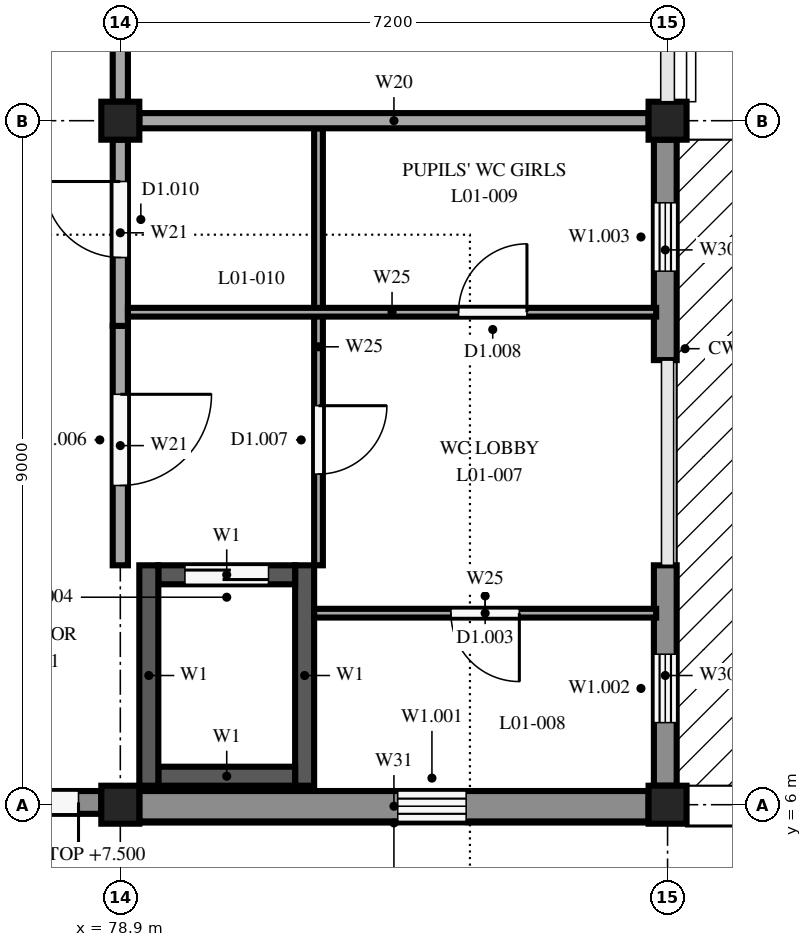
"""IFC4 building model, lengths in metres.
Left out: names, types, materials, properties, quantities, classifications, styles, units other than length and angle.
Written with IfcOpenShell. Run it as: python <this file> out.ifc"""

import sys

from ifc_helpers import new_model, si_unit, direction, frame, frame_2d, origin, origin_2d, place, context, subcontext, project, spatial, rectangle, extrude, element, fill, save


model = new_model("IFC4")
c1 = context("Model", 3, precision=1e-05, world=origin(), true_north=direction((0.0, 1.0)))
c2 = subcontext(c1, "Body", "Model", "MODEL_VIEW")
j1 = project(units=[si_unit("LENGTHUNIT", "METRE"), si_unit("PLANEANGLEUNIT", "RADIAN")], contexts=[c1])
p1 = place(None, origin())
s1 = spatial("IfcSite", under=j1, at=p1, CompositionType="ELEMENT")
p2 = place(p1, origin())
s2 = spatial("IfcBuilding", under=s1, at=p2, CompositionType="ELEMENT")
p3 = place(p2, frame((0.0, 0.0, 4.5)))
s3 = spatial("IfcBuildingStorey", under=s2, at=p3, CompositionType="ELEMENT", Elevation=4.5)
for number, where, z_axis, x_axis in (
    (1, (78.9, 6.0, 0.0), (0.0, 0.0, 1.0), (1.0, 0.0, 0.0)),
    (2, (78.9, 15.0, 0.0), (0.0, 0.0, 1.0), (1.0, 0.0, 0.0)),
    (3, (86.1, 6.0, 0.0), (0.0, 0.0, 1.0), (1.0, 0.0, 0.0)),
    (4, (86.1, 15.0, 0.0), (0.0, 0.0, 1.0), (1.0, 0.0, 0.0)),
):
    element("IfcColumn", number, at=place(p3, frame(where, z_axis=z_axis, x_axis=x_axis)), inside=s3, PredefinedType="COLUMN", context=c2, shape_type="SweptSolid", body=[
        extrude(rectangle(XDim=0.5, YDim=0.5, at=origin_2d()), origin(), (0.0, 0.0, 1.0), 3.35),
    ])
for number, where, z_axis, x_axis in (
    (5, (79.275, 6.25, 0.0), (0.0, 0.0, 1.0), (0.0, 1.0, 0.0)),
    (6, (81.325, 6.25, 0.0), (0.0, 0.0, 1.0), (0.0, 1.0, 0.0)),
):
    element("IfcWall", number, at=place(p3, frame(where, z_axis=z_axis, x_axis=x_axis)), inside=s3, PredefinedType="SHEAR", context=c2, shape_type="SweptSolid", body=[
        extrude(rectangle(XDim=2.9, YDim=0.25, at=frame_2d((1.45, 0.0))), origin(), (0.0, 0.0, 1.0), 3.35),
    ])
p4 = place(p3, frame((79.4, 6.375, 0.0), z_axis=(0.0, 0.0, 1.0), x_axis=(1.0, 0.0, 0.0)))
e7 = element("IfcWall", 7, at=p4, inside=s3, PredefinedType="SHEAR", context=c2, shape_type="SweptSolid", body=[
    extrude(rectangle(XDim=1.8, YDim=0.25, at=frame_2d((0.9, 0.0))), origin(), (0.0, 0.0, 1.0), 3.35),
])
p5 = place(p3, frame((79.4, 9.025, 0.0), z_axis=(0.0, 0.0, 1.0), x_axis=(1.0, 0.0, 0.0)))
e8 = element("IfcWall", 8, at=p5, inside=s3, PredefinedType="SHEAR", context=c2, shape_type="SweptSolid", body=[
    extrude(rectangle(XDim=1.8, YDim=0.25, at=frame_2d((0.9, 0.0))), origin(), (0.0, 0.0, 1.0), 3.35),
])
p6 = place(p5, frame((0.35, 0.0, 0.0)))
e9 = element("IfcOpeningElement", 9, at=p6, cuts=e8, PredefinedType="OPENING", context=c2, shape_type="SweptSolid", body=[
    extrude(rectangle(XDim=1.1, YDim=2.1, at=frame_2d((0.55, 1.05))), frame((0.0, 0.135, 0.0), z_axis=(0.0, -1.0, 0.0), x_axis=(1.0, 0.0, 0.0)), (0.0, 0.0, 1.0), 0.27),
])
p7 = place(p3, frame((86.07, 9.15, 0.0), z_axis=(0.0, 0.0, 1.0), x_axis=(0.0, -1.0, 0.0)))
e10 = element("IfcWall", 10, at=p7, inside=s3, PredefinedType="STANDARD", context=c2, shape_type="SweptSolid", body=[
    extrude(rectangle(XDim=2.9, YDim=0.3, at=frame_2d((1.45, 0.0))), origin(), (0.0, 0.0, 1.0), 2.85),
])
p8 = place(p7, frame((1.17, 0.0, 1.6)))
e11 = element("IfcOpeningElement", 11, at=p8, cuts=e10, PredefinedType="OPENING", context=c2, shape_type="SweptSolid", body=[
    extrude(rectangle(XDim=0.9, YDim=1.0, at=frame_2d((0.45, 0.5))), frame((0.0, 0.16, 0.0), z_axis=(0.0, -1.0, 0.0), x_axis=(1.0, 0.0, 0.0)), (0.0, 0.0, 1.0), 0.32),
])
p9 = place(p3, frame((86.07, 14.75, 0.0), z_axis=(0.0, 0.0, 1.0), x_axis=(0.0, -1.0, 0.0)))
e12 = element("IfcWall", 12, at=p9, inside=s3, PredefinedType="STANDARD", context=c2, shape_type="SweptSolid", body=[
    extrude(rectangle(XDim=2.9, YDim=0.3, at=frame_2d((1.45, 0.0))), origin(), (0.0, 0.0, 1.0), 2.85),
])
p10 = place(p9, frame((0.83, 0.0, 1.6)))
e13 = element("IfcOpeningElement", 13, at=p10, cuts=e12, PredefinedType="OPENING", context=c2, shape_type="SweptSolid", body=[
    extrude(rectangle(XDim=0.9, YDim=1.0, at=frame_2d((0.45, 0.5))), frame((0.0, 0.16, 0.0), z_axis=(0.0, -1.0, 0.0), x_axis=(1.0, 0.0, 0.0)), (0.0, 0.0, 1.0), 0.32),
])
p11 = place(p3, frame((78.65, 6.03, 0.0), z_axis=(0.0, 0.0, 1.0), x_axis=(-1.0, 0.0, 0.0)))
e14 = element("IfcWall", 14, at=p11, inside=s3, PredefinedType="STANDARD", context=c2, shape_type="SweptSolid", body=[
    extrude(rectangle(XDim=2.2, YDim=0.3, at=frame_2d((1.1, 0.0))), origin(), (0.0, 0.0, 1.0), 3.0),
])
p12 = place(p11, frame((0.3, 0.0, 0.0)))
e15 = element("IfcOpeningElement", 15, at=p12, cuts=e14, PredefinedType="OPENING", context=c2, shape_type="SweptSolid", body=[
    extrude(rectangle(XDim=1.6, YDim=2.4, at=frame_2d((0.8, 1.2))), frame((0.0, 0.16, 0.0), z_axis=(0.0, -1.0, 0.0), x_axis=(1.0, 0.0, 0.0)), (0.0, 0.0, 1.0), 0.32),
])
p13 = place(p3, frame((85.85, 5.98, 0.0), z_axis=(0.0, 0.0, 1.0), x_axis=(-1.0, 0.0, 0.0)))
e16 = element("IfcWall", 16, at=p13, inside=s3, PredefinedType="STANDARD", context=c2, shape_type="SweptSolid", body=[
    extrude(rectangle(XDim=6.7, YDim=0.4, at=frame_2d((3.35, 0.0))), origin(), (0.0, 0.0, 1.0), 2.9),
])
p14 = place(p13, frame((2.4, 0.0, 1.6)))
e17 = element("IfcOpeningElement", 17, at=p14, cuts=e16, PredefinedType="OPENING", context=c2, shape_type="SweptSolid", body=[
    extrude(rectangle(XDim=0.9, YDim=1.0, at=frame_2d((0.45, 0.5))), frame((0.0, 0.21, 0.0), z_axis=(0.0, -1.0, 0.0), x_axis=(1.0, 0.0, 0.0)), (0.0, 0.0, 1.0), 0.42),
])
p15 = place(p3, frame((78.9, 12.3, 0.0), z_axis=(0.0, 0.0, 1.0), x_axis=(0.0, -1.0, 0.0)))
e18 = element("IfcWall", 18, at=p15, inside=s3, PredefinedType="PARTITIONING", context=c2, shape_type="SweptSolid", body=[
    extrude(rectangle(XDim=3.15, YDim=0.2, at=frame_2d((1.575, 0.0))), origin(), (0.0, 0.0, 1.0), 2.9),
])
p16 = place(p15, frame((0.9, 0.0, 0.0)))
e19 = element("IfcOpeningElement", 19, at=p16, cuts=e18, PredefinedType="OPENING", context=c2, shape_type="SweptSolid", body=[
    extrude(rectangle(XDim=1.2, YDim=2.1, at=frame_2d((0.6, 1.05))), frame((0.0, 0.11, 0.0), z_axis=(0.0, -1.0, 0.0), x_axis=(1.0, 0.0, 0.0)), (0.0, 0.0, 1.0), 0.22),
])
p17 = place(p3, frame((78.9, 12.3, 0.0), z_axis=(0.0, 0.0, 1.0), x_axis=(0.0, 1.0, 0.0)))
e20 = element("IfcWall", 20, at=p17, inside=s3, PredefinedType="PARTITIONING", context=c2, shape_type="SweptSolid", body=[
    extrude(rectangle(XDim=2.45, YDim=0.2, at=frame_2d((1.225, 0.0))), origin(), (0.0, 0.0, 1.0), 2.9),
])
p18 = place(p17, frame((0.9, 0.0, 0.0)))
e21 = element("IfcOpeningElement", 21, at=p18, cuts=e20, PredefinedType="OPENING", context=c2, shape_type="SweptSolid", body=[
    extrude(rectangle(XDim=1.0, YDim=2.1, at=frame_2d((0.5, 1.05))), frame((0.0, 0.11, 0.0), z_axis=(0.0, -1.0, 0.0), x_axis=(1.0, 0.0, 0.0)), (0.0, 0.0, 1.0), 0.22),
])
p19 = place(p3, frame((79.15, 15.0, 0.0), z_axis=(0.0, 0.0, 1.0), x_axis=(1.0, 0.0, 0.0)))
e22 = element("IfcWall", 22, at=p19, inside=s3, PredefinedType="PARTITIONING", context=c2, shape_type="SweptSolid", body=[
    extrude(rectangle(XDim=6.7, YDim=0.2, at=frame_2d((3.35, 0.0))), origin(), (0.0, 0.0, 1.0), 2.9),
])
p20 = place(p3, frame((81.508, 14.9, 0.0), z_axis=(0.0, 0.0, 1.0), x_axis=(0.0, -1.0, 0.0)))
e23 = element("IfcWall", 23, at=p20, inside=s3, PredefinedType="PARTITIONING", context=c2, shape_type="SweptSolid", body=[
    extrude(rectangle(XDim=5.75, YDim=0.115, at=frame_2d((2.875, 0.0))), origin(), (0.0, 0.0, 1.0), 3.35),
])
p21 = place(p20, frame((3.65, 0.0, 0.0)))
e24 = element("IfcOpeningElement", 24, at=p21, cuts=e23, PredefinedType="OPENING", context=c2, shape_type="SweptSolid", body=[
    extrude(rectangle(XDim=0.9, YDim=2.1, at=frame_2d((0.45, 1.05))), frame((0.0, 0.067, 0.0), z_axis=(0.0, -1.0, 0.0), x_axis=(1.0, 0.0, 0.0)), (0.0, 0.0, 1.0), 0.135),
])
p22 = place(p3, frame((85.95, 8.52, 0.0), z_axis=(0.0, 0.0, 1.0), x_axis=(-1.0, 0.0, 0.0)))
e25 = element("IfcWall", 25, at=p22, inside=s3, PredefinedType="PARTITIONING", context=c2, shape_type="SweptSolid", body=[
    extrude(rectangle(XDim=4.5, YDim=0.115, at=frame_2d((2.25, 0.0))), origin(), (0.0, 0.0, 1.0), 3.35),
])
p23 = place(p22, frame((1.8, 0.0, 0.0)))
e26 = element("IfcOpeningElement", 26, at=p23, cuts=e25, PredefinedType="OPENING", context=c2, shape_type="SweptSolid", body=[
    extrude(rectangle(XDim=0.9, YDim=2.1, at=frame_2d((0.45, 1.05))), frame((0.0, 0.067, 0.0), z_axis=(0.0, -1.0, 0.0), x_axis=(1.0, 0.0, 0.0)), (0.0, 0.0, 1.0), 0.135),
])
p24 = place(p3, frame((79.0, 12.48, 0.0), z_axis=(0.0, 0.0, 1.0), x_axis=(1.0, 0.0, 0.0)))
e27 = element("IfcWall", 27, at=p24, inside=s3, PredefinedType="PARTITIONING", context=c2, shape_type="SweptSolid", body=[
    extrude(rectangle(XDim=6.95, YDim=0.115, at=frame_2d((3.475, 0.0))), origin(), (0.0, 0.0, 1.0), 3.35),
])
p25 = place(p24, frame((4.35, 0.0, 0.0)))
e28 = element("IfcOpeningElement", 28, at=p25, cuts=e27, PredefinedType="OPENING", context=c2, shape_type="SweptSolid", body=[
    extrude(rectangle(XDim=0.9, YDim=2.1, at=frame_2d((0.45, 1.05))), frame((0.0, 0.067, 0.0), z_axis=(0.0, -1.0, 0.0), x_axis=(1.0, 0.0, 0.0)), (0.0, 0.0, 1.0), 0.135),
])
p26 = place(p3, frame((78.9, 23.75, 0.0), z_axis=(0.0, 0.0, 1.0), x_axis=(0.0, -1.0, 0.0)))
e29 = element("IfcWall", 29, at=p26, inside=s3, PredefinedType="PARTITIONING", context=c2, shape_type="SweptSolid", body=[
    extrude(rectangle(XDim=8.5, YDim=0.2, at=frame_2d((4.25, 0.0))), origin(), (0.0, 0.0, 1.0), 2.9),
])
p27 = place(p26, frame((3.5, 0.0, 0.0)))
e30 = element("IfcOpeningElement", 30, at=p27, cuts=e29, PredefinedType="OPENING", context=c2, shape_type="SweptSolid", body=[
    extrude(rectangle(XDim=1.5, YDim=2.1, at=frame_2d((0.75, 1.05))), frame((0.0, 0.11, 0.0), z_axis=(0.0, -1.0, 0.0), x_axis=(1.0, 0.0, 0.0)), (0.0, 0.0, 1.0), 0.22),
])
p28 = place(p8, origin())
e31 = element("IfcWindow", 31, at=p28, inside=s3, PartitioningType="SINGLE_PANEL", PredefinedType="WINDOW", context=c2, shape_type="SweptSolid", body=[
    extrude(rectangle(XDim=0.9, YDim=1.0, at=frame_2d((0.45, 0.5))), frame((0.0, 0.03, 0.0), z_axis=(0.0, -1.0, 0.0), x_axis=(1.0, 0.0, 0.0)), (0.0, 0.0, 1.0), 0.06),
])
fill(e11, e31)
p29 = place(p10, origin())
e32 = element("IfcWindow", 32, at=p29, inside=s3, PartitioningType="SINGLE_PANEL", PredefinedType="WINDOW", context=c2, shape_type="SweptSolid", body=[
    extrude(rectangle(XDim=0.9, YDim=1.0, at=frame_2d((0.45, 0.5))), frame((0.0, 0.03, 0.0), z_axis=(0.0, -1.0, 0.0), x_axis=(1.0, 0.0, 0.0)), (0.0, 0.0, 1.0), 0.06),
])
fill(e13, e32)
p30 = place(p12, origin())
e33 = element("IfcDoor", 33, at=p30, inside=s3, OperationType="DOUBLE_DOOR_SINGLE_SWING", PredefinedType="DOOR", context=c2, shape_type="SweptSolid", body=[
    extrude(rectangle(XDim=1.6, YDim=2.4, at=frame_2d((0.8, 1.2))), frame((0.0, 0.025, 0.0), z_axis=(0.0, -1.0, 0.0), x_axis=(1.0, 0.0, 0.0)), (0.0, 0.0, 1.0), 0.05),
])
fill(e15, e33)
p31 = place(p14, origin())
e34 = element("IfcWindow", 34, at=p31, inside=s3, PartitioningType="SINGLE_PANEL", PredefinedType="WINDOW", context=c2, shape_type="SweptSolid", body=[
    extrude(rectangle(XDim=0.9, YDim=1.0, at=frame_2d((0.45, 0.5))), frame((0.0, 0.03, 0.0), z_axis=(0.0, -1.0, 0.0), x_axis=(1.0, 0.0, 0.0)), (0.0, 0.0, 1.0), 0.06),
])
fill(e17, e34)
p32 = place(p16, origin())
e35 = element("IfcDoor", 35, at=p32, inside=s3, OperationType="SINGLE_SWING_LEFT", PredefinedType="DOOR", context=c2, shape_type="SweptSolid", body=[
    extrude(rectangle(XDim=1.2, YDim=2.1, at=frame_2d((0.6, 1.05))), frame((0.0, 0.025, 0.0), z_axis=(0.0, -1.0, 0.0), x_axis=(1.0, 0.0, 0.0)), (0.0, 0.0, 1.0), 0.05),
])
fill(e19, e35)
p33 = place(p18, origin())
e36 = element("IfcDoor", 36, at=p33, inside=s3, OperationType="SINGLE_SWING_RIGHT", PredefinedType="DOOR", context=c2, shape_type="SweptSolid", body=[
    extrude(rectangle(XDim=1.0, YDim=2.1, at=frame_2d((0.5, 1.05))), frame((0.0, 0.025, 0.0), z_axis=(0.0, -1.0, 0.0), x_axis=(1.0, 0.0, 0.0)), (0.0, 0.0, 1.0), 0.05),
])
fill(e21, e36)
p34 = place(p21, origin())
e37 = element("IfcDoor", 37, at=p34, inside=s3, OperationType="SINGLE_SWING_LEFT", PredefinedType="DOOR", context=c2, shape_type="SweptSolid", body=[
    extrude(rectangle(XDim=0.9, YDim=2.1, at=frame_2d((0.45, 1.05))), frame((0.0, 0.025, 0.0), z_axis=(0.0, -1.0, 0.0), x_axis=(1.0, 0.0, 0.0)), (0.0, 0.0, 1.0), 0.05),
])
fill(e24, e37)
p35 = place(p23, origin())
e38 = element("IfcDoor", 38, at=p35, inside=s3, OperationType="SINGLE_SWING_LEFT", PredefinedType="DOOR", context=c2, shape_type="SweptSolid", body=[
    extrude(rectangle(XDim=0.9, YDim=2.1, at=frame_2d((0.45, 1.05))), frame((0.0, 0.025, 0.0), z_axis=(0.0, -1.0, 0.0), x_axis=(1.0, 0.0, 0.0)), (0.0, 0.0, 1.0), 0.05),
])
fill(e26, e38)
p36 = place(p25, origin())
e39 = element("IfcDoor", 39, at=p36, inside=s3, OperationType="SINGLE_SWING_RIGHT", PredefinedType="DOOR", context=c2, shape_type="SweptSolid", body=[
    extrude(rectangle(XDim=0.9, YDim=2.1, at=frame_2d((0.45, 1.05))), frame((0.0, 0.025, 0.0), z_axis=(0.0, -1.0, 0.0), x_axis=(1.0, 0.0, 0.0)), (0.0, 0.0, 1.0), 0.05),
])
fill(e28, e39)
p37 = place(p6, origin())
e40 = element("IfcDoor", 40, at=p37, inside=s3, OperationType="SLIDING_TO_LEFT", PredefinedType="DOOR", context=c2, shape_type="SweptSolid", body=[
    extrude(rectangle(XDim=1.1, YDim=2.1, at=frame_2d((0.55, 1.05))), frame((0.0, 0.025, 0.0), z_axis=(0.0, -1.0, 0.0), x_axis=(1.0, 0.0, 0.0)), (0.0, 0.0, 1.0), 0.05),
])
fill(e9, e40)
save(model, sys.argv[1])
